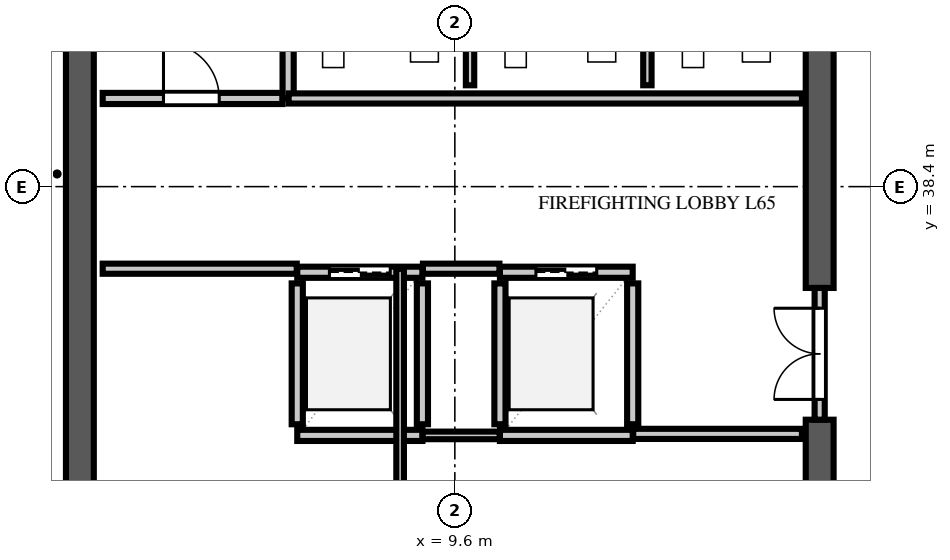
"""IFC4 building model, lengths in metres.
Left out: names, types, materials, properties, quantities, classifications, styles, units other than length and angle.
Written with IfcOpenShell. Run it as: python <this file> out.ifc"""

import sys

from ifc_helpers import new_model, si_unit, direction, frame, frame_2d, origin, place, context, subcontext, project, spatial, rectangle, extrude, element, fill, save


model = new_model("IFC4")
c1 = context("Model", 3, precision=1e-05, world=origin(), true_north=direction((0.0, 1.0)))
c2 = subcontext(c1, "Body", "Model", "MODEL_VIEW")
j1 = project(units=[si_unit("LENGTHUNIT", "METRE"), si_unit("PLANEANGLEUNIT", "RADIAN")], contexts=[c1])
p1 = place(None, origin())
s1 = spatial("IfcSite", under=j1, at=p1, CompositionType="ELEMENT")
p2 = place(p1, origin())
s2 = spatial("IfcBuilding", under=s1, at=p2, CompositionType="ELEMENT")
p3 = place(p2, frame((0.0, 0.0, 256.0)))
s3 = spatial("IfcBuildingStorey", under=s2, at=p3, CompositionType="ELEMENT", Elevation=256.0)
p4 = place(p3, frame((2.2, 9.325, 0.0), z_axis=(0.0, 0.0, 1.0), x_axis=(0.0, 1.0, 0.0)))
e1 = element("IfcWall", 1, at=p4, inside=s3, PredefinedType="SHEAR", context=c2, shape_type="SweptSolid", body=[
    extrude(rectangle(XDim=38.95, YDim=0.55, at=frame_2d((19.475, 0.0))), origin(), (0.0, 0.0, 1.0), 4.74),
])
p5 = place(p3, frame((16.8, 26.0, 0.0), z_axis=(0.0, 0.0, 1.0), x_axis=(0.0, 1.0, 0.0)))
e2 = element("IfcWall", 2, at=p5, inside=s3, PredefinedType="SHEAR", context=c2, shape_type="SweptSolid", body=[
    extrude(rectangle(XDim=7.8, YDim=0.55, at=frame_2d((3.9, 0.0))), origin(), (0.0, 0.0, 1.0), 4.74),
])
p6 = place(p3, frame((16.8, 36.4, 0.0), z_axis=(0.0, 0.0, 1.0), x_axis=(0.0, 1.0, 0.0)))
e3 = element("IfcWall", 3, at=p6, inside=s3, PredefinedType="SHEAR", context=c2, shape_type="SweptSolid", body=[
    extrude(rectangle(XDim=11.325, YDim=0.55, at=frame_2d((5.663, 0.0))), origin(), (0.0, 0.0, 1.0), 4.74),
])
p7 = place(p6, frame((9.2, 0.0, 0.0)))
e4 = element("IfcOpeningElement", 4, at=p7, cuts=e3, PredefinedType="OPENING", context=c2, shape_type="SweptSolid", body=[
    extrude(rectangle(XDim=0.95, YDim=2.15, at=frame_2d((0.475, 1.075))), frame((0.0, 0.287, 0.0), z_axis=(0.0, -1.0, 0.0), x_axis=(1.0, 0.0, 0.0)), (0.0, 0.0, 1.0), 0.574),
])
p8 = place(p3, frame((2.65, 40.14, 0.0), z_axis=(0.0, 0.0, 1.0), x_axis=(1.0, 0.0, 0.0)))
e5 = element("IfcWall", 5, at=p8, inside=s3, PredefinedType="SOLIDWALL", context=c2, shape_type="SweptSolid", body=[
    extrude(rectangle(XDim=3.55, YDim=0.22, at=frame_2d((1.775, 0.0))), origin(), (0.0, 0.0, 1.0), 4.74),
])
p9 = place(p8, frame((1.2, 0.0, 0.0)))
e6 = element("IfcOpeningElement", 6, at=p9, cuts=e5, PredefinedType="OPENING", context=c2, shape_type="SweptSolid", body=[
    extrude(rectangle(XDim=1.1, YDim=2.2, at=frame_2d((0.55, 1.1))), frame((0.0, 0.122, 0.0), z_axis=(0.0, -1.0, 0.0), x_axis=(1.0, 0.0, 0.0)), (0.0, 0.0, 1.0), 0.244),
])
p10 = place(p3, frame((6.31, 40.14, 0.0), z_axis=(0.0, 0.0, 1.0), x_axis=(0.0, 1.0, 0.0)))
e7 = element("IfcWall", 7, at=p10, inside=s3, PredefinedType="SOLIDWALL", context=c2, shape_type="SweptSolid", body=[
    extrude(rectangle(XDim=7.81, YDim=0.22, at=frame_2d((3.905, 0.0))), origin(), (0.0, 0.0, 1.0), 4.74),
])
for number, where, z_axis, x_axis in (
    (8, (6.49, 33.71, 0.0), (0.0, 0.0, 1.0), (0.0, 1.0, 0.0)),
    (9, (8.96, 33.71, 0.0), (0.0, 0.0, 1.0), (0.0, 1.0, 0.0)),
):
    element("IfcWall", number, at=place(p3, frame(where, z_axis=z_axis, x_axis=x_axis)), inside=s3, PredefinedType="SOLIDWALL", context=c2, shape_type="SweptSolid", body=[
        extrude(rectangle(XDim=2.78, YDim=0.22, at=frame_2d((1.39, 0.0))), origin(), (0.0, 0.0, 1.0), 4.74),
    ])
p11 = place(p3, frame((6.49, 33.49, 0.0), z_axis=(0.0, 0.0, 1.0), x_axis=(1.0, 0.0, 0.0)))
e10 = element("IfcWall", 10, at=p11, inside=s3, PredefinedType="SOLIDWALL", context=c2, shape_type="SweptSolid", body=[
    extrude(rectangle(XDim=2.47, YDim=0.22, at=frame_2d((1.235, 0.0))), origin(), (0.0, 0.0, 1.0), 4.74),
])
p12 = place(p3, frame((6.49, 36.71, 0.0), z_axis=(0.0, 0.0, 1.0), x_axis=(1.0, 0.0, 0.0)))
e11 = element("IfcWall", 11, at=p12, inside=s3, PredefinedType="SOLIDWALL", context=c2, shape_type="SweptSolid", body=[
    extrude(rectangle(XDim=2.47, YDim=0.22, at=frame_2d((1.235, 0.0))), origin(), (0.0, 0.0, 1.0), 4.74),
])
p13 = place(p12, frame((0.635, 0.0, 0.0)))
e12 = element("IfcOpeningElement", 12, at=p13, cuts=e11, PredefinedType="OPENING", context=c2, shape_type="SweptSolid", body=[
    extrude(rectangle(XDim=1.2, YDim=2.2, at=frame_2d((0.6, 1.1))), frame((0.0, 0.122, 0.0), z_axis=(0.0, -1.0, 0.0), x_axis=(1.0, 0.0, 0.0)), (0.0, 0.0, 1.0), 0.244),
])
for number, where, z_axis, x_axis in (
    (13, (10.49, 33.71, 0.0), (0.0, 0.0, 1.0), (0.0, 1.0, 0.0)),
    (14, (13.11, 33.71, 0.0), (0.0, 0.0, 1.0), (0.0, 1.0, 0.0)),
):
    element("IfcWall", number, at=place(p3, frame(where, z_axis=z_axis, x_axis=x_axis)), inside=s3, PredefinedType="SOLIDWALL", context=c2, shape_type="SweptSolid", body=[
        extrude(rectangle(XDim=2.78, YDim=0.22, at=frame_2d((1.39, 0.0))), origin(), (0.0, 0.0, 1.0), 4.74),
    ])
p14 = place(p3, frame((10.49, 33.49, 0.0), z_axis=(0.0, 0.0, 1.0), x_axis=(1.0, 0.0, 0.0)))
e15 = element("IfcWall", 15, at=p14, inside=s3, PredefinedType="SOLIDWALL", context=c2, shape_type="SweptSolid", body=[
    extrude(rectangle(XDim=2.62, YDim=0.22, at=frame_2d((1.31, 0.0))), origin(), (0.0, 0.0, 1.0), 4.74),
])
p15 = place(p3, frame((10.49, 36.71, 0.0), z_axis=(0.0, 0.0, 1.0), x_axis=(1.0, 0.0, 0.0)))
e16 = element("IfcWall", 16, at=p15, inside=s3, PredefinedType="SOLIDWALL", context=c2, shape_type="SweptSolid", body=[
    extrude(rectangle(XDim=2.62, YDim=0.22, at=frame_2d((1.31, 0.0))), origin(), (0.0, 0.0, 1.0), 4.74),
])
p16 = place(p15, frame((0.71, 0.0, 0.0)))
e17 = element("IfcOpeningElement", 17, at=p16, cuts=e16, PredefinedType="OPENING", context=c2, shape_type="SweptSolid", body=[
    extrude(rectangle(XDim=1.2, YDim=2.2, at=frame_2d((0.6, 1.1))), frame((0.0, 0.122, 0.0), z_axis=(0.0, -1.0, 0.0), x_axis=(1.0, 0.0, 0.0)), (0.0, 0.0, 1.0), 0.244),
])
p17 = place(p3, frame((2.65, 36.78, 0.0), z_axis=(0.0, 0.0, 1.0), x_axis=(1.0, 0.0, 0.0)))
e18 = element("IfcWall", 18, at=p17, inside=s3, PredefinedType="SOLIDWALL", context=c2, shape_type="SweptSolid", body=[
    extrude(rectangle(XDim=3.83, YDim=0.2, at=frame_2d((1.915, 0.0))), origin(), (0.0, 0.0, 1.0), 4.74),
])
p18 = place(p3, frame((8.97, 36.78, 0.0), z_axis=(0.0, 0.0, 1.0), x_axis=(1.0, 0.0, 0.0)))
e19 = element("IfcWall", 19, at=p18, inside=s3, PredefinedType="SOLIDWALL", context=c2, shape_type="SweptSolid", body=[
    extrude(rectangle(XDim=1.51, YDim=0.2, at=frame_2d((0.755, 0.0))), origin(), (0.0, 0.0, 1.0), 4.74),
])
p19 = place(p3, frame((13.12, 33.52, 0.0), z_axis=(0.0, 0.0, 1.0), x_axis=(1.0, 0.0, 0.0)))
e20 = element("IfcWall", 20, at=p19, inside=s3, PredefinedType="SOLIDWALL", context=c2, shape_type="SweptSolid", body=[
    extrude(rectangle(XDim=3.33, YDim=0.2, at=frame_2d((1.665, 0.0))), origin(), (0.0, 0.0, 1.0), 4.74),
])
p20 = place(p3, frame((6.32, 40.14, 0.0), z_axis=(0.0, 0.0, 1.0), x_axis=(1.0, 0.0, 0.0)))
e21 = element("IfcWall", 21, at=p20, inside=s3, PredefinedType="SOLIDWALL", context=c2, shape_type="SweptSolid", body=[
    extrude(rectangle(XDim=10.13, YDim=0.2, at=frame_2d((5.065, 0.0))), origin(), (0.0, 0.0, 1.0), 4.74),
])
p21 = place(p3, frame((16.8, 33.8, 0.0), z_axis=(0.0, 0.0, 1.0), x_axis=(0.0, 1.0, 0.0)))
e22 = element("IfcWall", 22, at=p21, inside=s3, PredefinedType="SOLIDWALL", context=c2, shape_type="SweptSolid", body=[
    extrude(rectangle(XDim=2.6, YDim=0.2, at=frame_2d((1.3, 0.0))), origin(), (0.0, 0.0, 1.0), 4.74),
])
p22 = place(p21, frame((0.4, 0.0, 0.0)))
e23 = element("IfcOpeningElement", 23, at=p22, cuts=e22, PredefinedType="OPENING", context=c2, shape_type="SweptSolid", body=[
    extrude(rectangle(XDim=1.8, YDim=2.2, at=frame_2d((0.9, 1.1))), frame((0.0, 0.112, 0.0), z_axis=(0.0, -1.0, 0.0), x_axis=(1.0, 0.0, 0.0)), (0.0, 0.0, 1.0), 0.224),
])
p23 = place(p3, frame((8.965, 33.49, 0.0), z_axis=(0.0, 0.0, 1.0), x_axis=(1.0, 0.0, 0.0)))
e24 = element("IfcWall", 24, at=p23, inside=s3, PredefinedType="PARTITIONING", context=c2, shape_type="SweptSolid", body=[
    extrude(rectangle(XDim=1.52, YDim=0.15, at=frame_2d((0.76, 0.0))), origin(), (0.0, 0.0, 1.0), 4.74),
])
p24 = place(p3, frame((8.52, 12.02, 0.0), z_axis=(0.0, 0.0, 1.0), x_axis=(0.0, 1.0, 0.0)))
e25 = element("IfcWall", 25, at=p24, inside=s3, PredefinedType="PARTITIONING", context=c2, shape_type="SweptSolid", body=[
    extrude(rectangle(XDim=24.76, YDim=0.15, at=frame_2d((12.38, 0.0))), origin(), (0.0, 0.0, 1.0), 4.74),
])
p25 = place(p24, frame((6.0, 0.0, 0.0)))
e26 = element("IfcOpeningElement", 26, at=p25, cuts=e25, PredefinedType="OPENING", context=c2, shape_type="SweptSolid", body=[
    extrude(rectangle(XDim=1.8, YDim=2.2, at=frame_2d((0.9, 1.1))), frame((0.0, 0.087, 0.0), z_axis=(0.0, -1.0, 0.0), x_axis=(1.0, 0.0, 0.0)), (0.0, 0.0, 1.0), 0.174),
])
for number, where, z_axis, x_axis in (
    (27, (9.9, 40.4, 0.0), (0.0, 0.0, 1.0), (0.0, 1.0, 0.0)),
    (28, (13.4, 40.4, 0.0), (0.0, 0.0, 1.0), (0.0, 1.0, 0.0)),
):
    element("IfcWall", number, at=place(p3, frame(where, z_axis=z_axis, x_axis=x_axis)), inside=s3, PredefinedType="PLUMBINGWALL", context=c2, shape_type="SweptSolid", body=[
        extrude(rectangle(XDim=4.92, YDim=0.165, at=frame_2d((2.46, 0.0))), origin(), (0.0, 0.0, 1.0), 4.74),
    ])
p26 = place(p9, origin())
e29 = element("IfcDoor", 29, at=p26, inside=s3, OperationType="SINGLE_SWING_LEFT", PredefinedType="DOOR", context=c2, shape_type="SweptSolid", body=[
    extrude(rectangle(XDim=1.1, YDim=2.2, at=frame_2d((0.55, 1.1))), frame((0.0, 0.025, 0.0), z_axis=(0.0, -1.0, 0.0), x_axis=(1.0, 0.0, 0.0)), (0.0, 0.0, 1.0), 0.05),
])
fill(e6, e29)
p27 = place(p13, origin())
e30 = element("IfcDoor", 30, at=p27, inside=s3, OperationType="DOUBLE_DOOR_SLIDING", PredefinedType="DOOR", context=c2, shape_type="SweptSolid", body=[
    extrude(rectangle(XDim=1.2, YDim=2.2, at=frame_2d((0.6, 1.1))), frame((0.0, 0.025, 0.0), z_axis=(0.0, -1.0, 0.0), x_axis=(1.0, 0.0, 0.0)), (0.0, 0.0, 1.0), 0.05),
])
fill(e12, e30)
p28 = place(p16, origin())
e31 = element("IfcDoor", 31, at=p28, inside=s3, OperationType="DOUBLE_DOOR_SLIDING", PredefinedType="DOOR", context=c2, shape_type="SweptSolid", body=[
    extrude(rectangle(XDim=1.2, YDim=2.2, at=frame_2d((0.6, 1.1))), frame((0.0, 0.025, 0.0), z_axis=(0.0, -1.0, 0.0), x_axis=(1.0, 0.0, 0.0)), (0.0, 0.0, 1.0), 0.05),
])
fill(e17, e31)
p29 = place(p22, origin())
e32 = element("IfcDoor", 32, at=p29, inside=s3, OperationType="DOUBLE_DOOR_SINGLE_SWING", PredefinedType="DOOR", context=c2, shape_type="SweptSolid", body=[
    extrude(rectangle(XDim=1.8, YDim=2.2, at=frame_2d((0.9, 1.1))), frame((0.0, 0.025, 0.0), z_axis=(0.0, -1.0, 0.0), x_axis=(1.0, 0.0, 0.0)), (0.0, 0.0, 1.0), 0.05),
])
fill(e23, e32)
save(model, sys.argv[1])
